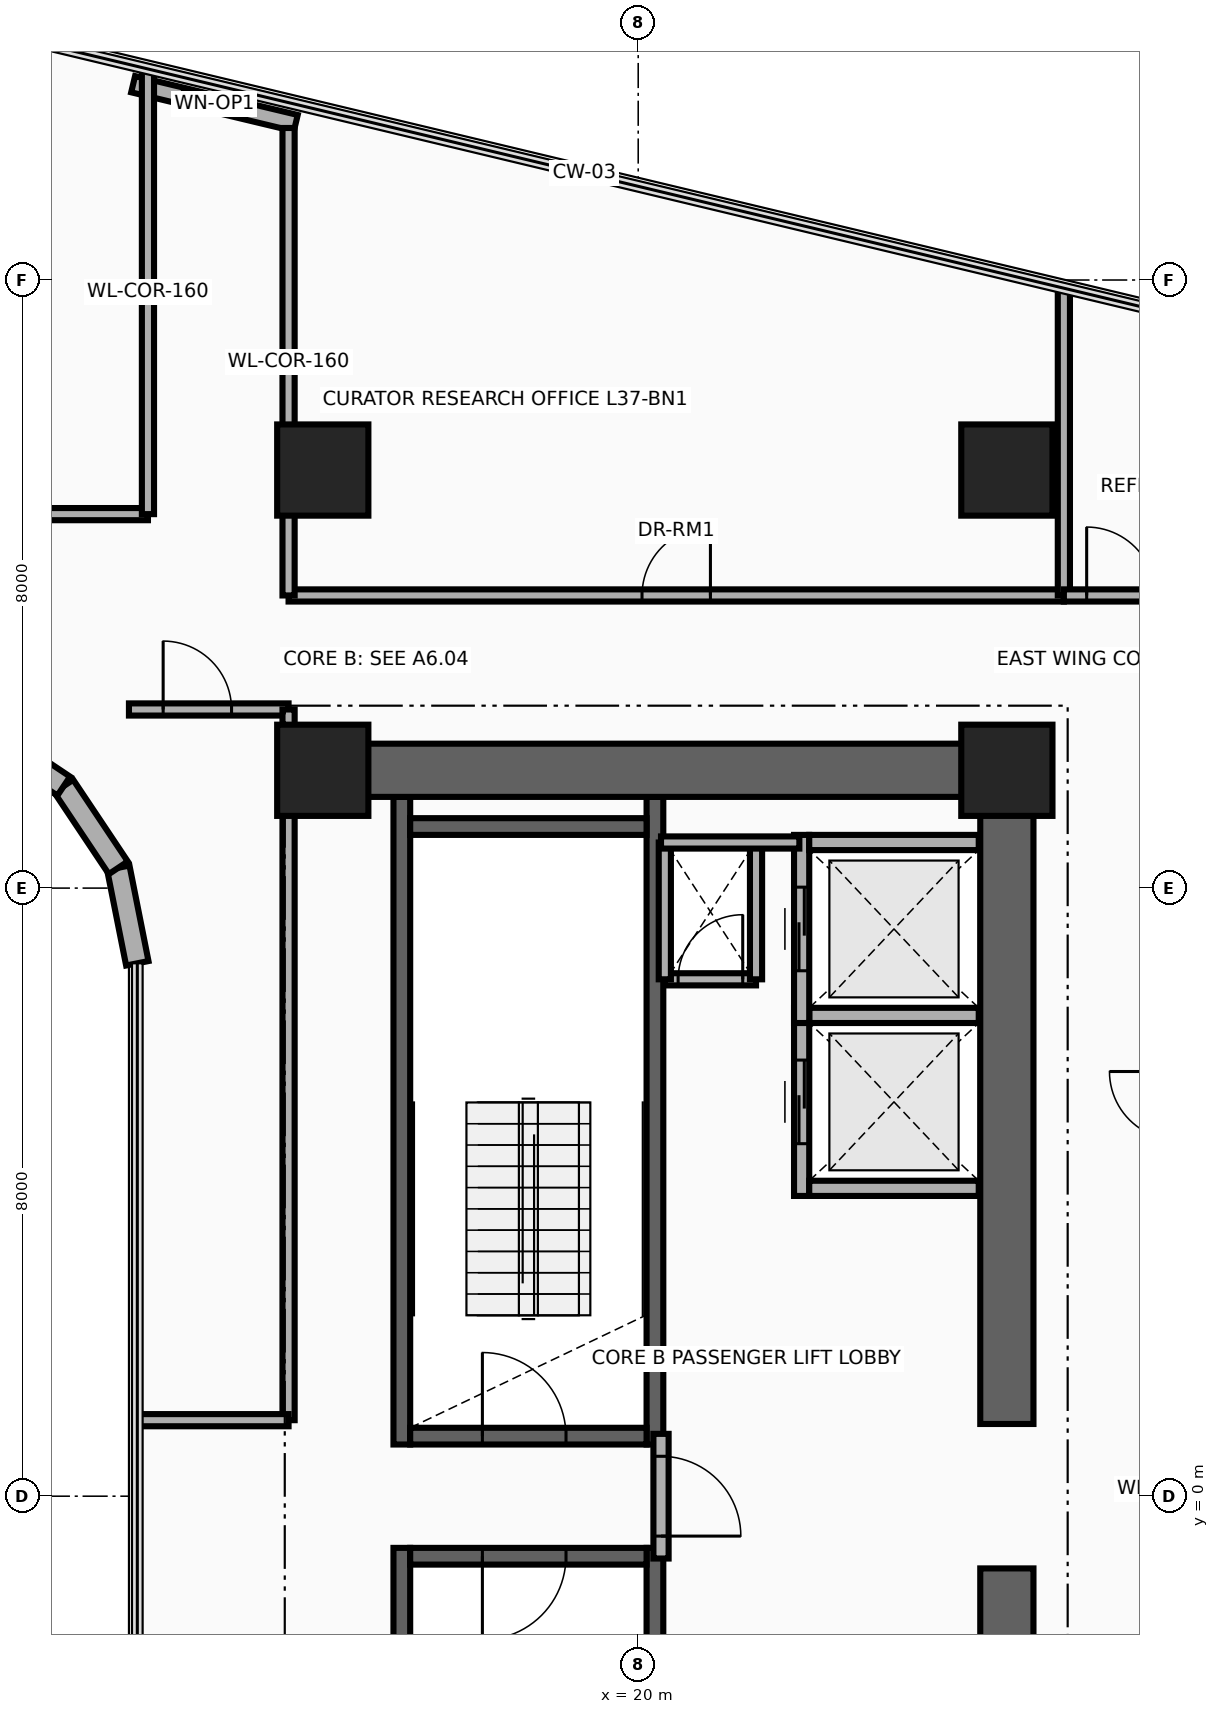
"""IFC4 building model, lengths in metres.
Left out: names, types, materials, properties, quantities, classifications, styles, units other than length and angle.
Written with IfcOpenShell. Run it as: python <this file> out.ifc"""

import sys

from ifc_helpers import new_model, si_unit, direction, frame, frame_2d, origin, origin_2d, place, context, subcontext, project, spatial, rectangle, extrude, source, transform, mapped, element, fill, save


model = new_model("IFC4")
c1 = context("Model", 3, precision=1e-05, world=origin(), true_north=direction((0.0, 1.0)))
c2 = subcontext(c1, "Body", "Model", "MODEL_VIEW")
j1 = project(units=[si_unit("LENGTHUNIT", "METRE"), si_unit("PLANEANGLEUNIT", "RADIAN")], contexts=[c1])
p1 = place(None, origin())
s1 = spatial("IfcSite", under=j1, at=p1, CompositionType="ELEMENT")
p2 = place(p1, origin())
s2 = spatial("IfcBuilding", under=s1, at=p2, CompositionType="ELEMENT")
p3 = place(p2, frame((0.0, 0.0, 146.4)))
s3 = spatial("IfcBuildingStorey", under=s2, at=p3, CompositionType="ELEMENT", Elevation=146.4)
for number, where, z_axis, x_axis in (
    (1, (16.89, 0.68, 0.0), (0.0, 0.0, 1.0), (0.0, 1.0, 0.0)),
    (2, (20.22, 0.68, 0.0), (0.0, 0.0, 1.0), (0.0, 1.0, 0.0)),
):
    element("IfcWall", number, at=place(p3, frame(where, z_axis=z_axis, x_axis=x_axis)), inside=s3, PredefinedType="SHEAR", context=c2, shape_type="SweptSolid", body=[
        extrude(rectangle(XDim=8.52, YDim=0.22, at=frame_2d((4.26, 0.0))), origin(), (0.0, 0.0, 1.0), 3.46),
    ])
p4 = place(p3, frame((17.0, 0.79, 0.0), z_axis=(0.0, 0.0, 1.0), x_axis=(1.0, 0.0, 0.0)))
e3 = element("IfcWall", 3, at=p4, inside=s3, PredefinedType="SHEAR", context=c2, shape_type="SweptSolid", body=[
    extrude(rectangle(XDim=3.11, YDim=0.22, at=frame_2d((1.555, 0.0))), origin(), (0.0, 0.0, 1.0), 3.46),
])
p5 = place(p4, frame((0.95, 0.0, 0.0)))
e4 = element("IfcOpeningElement", 4, at=p5, cuts=e3, PredefinedType="OPENING", context=c2, shape_type="SweptSolid", body=[
    extrude(rectangle(XDim=1.1, YDim=2.15, at=frame_2d((0.55, 1.075))), frame((0.0, 0.125, 0.0), z_axis=(0.0, -1.0, 0.0), x_axis=(1.0, 0.0, 0.0)), (0.0, 0.0, 1.0), 0.25),
])
p6 = place(p3, frame((17.0, 8.81, 0.0), z_axis=(0.0, 0.0, 1.0), x_axis=(1.0, 0.0, 0.0)))
e5 = element("IfcWall", 5, at=p6, inside=s3, PredefinedType="SHEAR", context=c2, shape_type="SweptSolid", body=[
    extrude(rectangle(XDim=3.11, YDim=0.22, at=frame_2d((1.555, 0.0))), origin(), (0.0, 0.0, 1.0), 3.46),
])
for number, where, z_axis, x_axis in (
    (6, (16.89, -9.2, 0.0), (0.0, 0.0, 1.0), (0.0, 1.0, 0.0)),
    (7, (20.22, -9.2, 0.0), (0.0, 0.0, 1.0), (0.0, 1.0, 0.0)),
):
    element("IfcWall", number, at=place(p3, frame(where, z_axis=z_axis, x_axis=x_axis)), inside=s3, PredefinedType="SHEAR", context=c2, shape_type="SweptSolid", body=[
        extrude(rectangle(XDim=8.52, YDim=0.22, at=frame_2d((4.26, 0.0))), origin(), (0.0, 0.0, 1.0), 3.46),
    ])
p7 = place(p3, frame((17.0, -0.79, 0.0), z_axis=(0.0, 0.0, 1.0), x_axis=(1.0, 0.0, 0.0)))
e8 = element("IfcWall", 8, at=p7, inside=s3, PredefinedType="SHEAR", context=c2, shape_type="SweptSolid", body=[
    extrude(rectangle(XDim=3.11, YDim=0.22, at=frame_2d((1.555, 0.0))), origin(), (0.0, 0.0, 1.0), 3.46),
])
p8 = place(p7, frame((0.95, 0.0, 0.0)))
e9 = element("IfcOpeningElement", 9, at=p8, cuts=e8, PredefinedType="OPENING", context=c2, shape_type="SweptSolid", body=[
    extrude(rectangle(XDim=1.1, YDim=2.15, at=frame_2d((0.55, 1.075))), frame((0.0, 0.125, 0.0), z_axis=(0.0, -1.0, 0.0), x_axis=(1.0, 0.0, 0.0)), (0.0, 0.0, 1.0), 0.25),
])
for number, where, z_axis, x_axis in (
    (10, (24.85, -9.9, 0.0), (0.0, 0.0, 1.0), (0.0, 1.0, 0.0)),
    (11, (24.85, 0.95, 0.0), (0.0, 0.0, 1.0), (0.0, 1.0, 0.0)),
):
    element("IfcWall", number, at=place(p3, frame(where, z_axis=z_axis, x_axis=x_axis)), inside=s3, PredefinedType="SHEAR", context=c2, shape_type="SweptSolid", body=[
        extrude(rectangle(XDim=8.95, YDim=0.7, at=frame_2d((4.475, 0.0))), origin(), (0.0, 0.0, 1.0), 3.46),
    ])
p9 = place(p3, frame((15.85, 9.55, 0.0), z_axis=(0.0, 0.0, 1.0), x_axis=(1.0, 0.0, 0.0)))
e12 = element("IfcWall", 12, at=p9, inside=s3, PredefinedType="SHEAR", context=c2, shape_type="SweptSolid", body=[
    extrude(rectangle(XDim=9.0, YDim=0.7, at=frame_2d((4.5, 0.0))), origin(), (0.0, 0.0, 1.0), 3.46),
])
m1 = source(origin(), c2, "Body", "SweptSolid", [
    extrude(rectangle(XDim=1.2, YDim=1.2, at=origin_2d()), origin(), (0.0, 0.0, 1.0), 3.7),
])
for number, where, z_axis, x_axis in (
    (13, (15.85, 9.55, 0.0), (0.0, 0.0, 1.0), (1.0, 0.0, 0.0)),
    (14, (24.85, 9.55, 0.0), (0.0, 0.0, 1.0), (1.0, 0.0, 0.0)),
    (15, (15.85, 13.5, 0.0), (0.0, 0.0, 1.0), (1.0, 0.0, 0.0)),
    (16, (24.85, 13.5, 0.0), (0.0, 0.0, 1.0), (1.0, 0.0, 0.0)),
):
    element("IfcColumn", number, at=place(p3, frame(where, z_axis=z_axis, x_axis=x_axis)), inside=s3, PredefinedType="COLUMN", context=c2, shape_type="MappedRepresentation", body=[
        mapped(m1, transform((0.0, 0.0, 0.0), x_axis=(1.0, 0.0, 0.0), y_axis=(0.0, 1.0, 0.0), z_axis=(0.0, 0.0, 1.0), scale=1.0)),
    ])
p10 = place(p3, frame((13.355, 18.576, 0.0), z_axis=(0.0, 0.0, 1.0), x_axis=(0.97252211384, -0.232810519721, 0.0)))
e17 = element("IfcWall", 17, at=p10, inside=s3, PredefinedType="SOLIDWALL", context=c2, shape_type="SweptSolid", body=[
    extrude(rectangle(XDim=2.2, YDim=0.22, at=frame_2d((1.1, 0.0))), origin(), (0.0, 0.0, 1.0), 3.46),
])
p11 = place(p10, frame((0.65, 0.0, 0.95)))
e18 = element("IfcOpeningElement", 18, at=p11, cuts=e17, PredefinedType="OPENING", context=c2, shape_type="SweptSolid", body=[
    extrude(rectangle(XDim=0.9, YDim=1.3, at=frame_2d((0.45, 0.65))), frame((0.0, 0.125, 0.0), z_axis=(0.0, -1.0, 0.0), x_axis=(1.0, 0.0, 0.0)), (0.0, 0.0, 1.0), 0.25),
])
p12 = place(p3, frame((13.41, 7.011, 0.0), z_axis=(0.0, 0.0, 1.0), x_axis=(-0.195090163074, 0.980785312019, 0.0)))
e19 = element("IfcWall", 19, at=p12, inside=s3, PredefinedType="SOLIDWALL", context=c2, shape_type="SweptSolid", body=[
    extrude(rectangle(XDim=1.281, YDim=0.3, at=frame_2d((0.641, 0.0))), origin(), (0.0, 0.0, 1.0), 3.46),
])
for number, where, z_axis, x_axis in (
    (20, (13.16, 8.268, 0.0), (0.0, 0.0, 1.0), (-0.556, 0.831, 0.0)),
    (21, (12.442, 9.342, 0.0), (0.0, 0.0, 1.0), (-0.831, 0.556, 0.0)),
):
    element("IfcWall", number, at=place(p3, frame(where, z_axis=z_axis, x_axis=x_axis)), inside=s3, PredefinedType="SOLIDWALL", context=c2, shape_type="SweptSolid", body=[
        extrude(rectangle(XDim=1.292, YDim=0.3, at=frame_2d((0.646, 0.0))), origin(), (0.0, 0.0, 1.0), 3.46),
    ])
p13 = place(p3, frame((22.15, 3.95, 0.0), z_axis=(0.0, 0.0, 1.0), x_axis=(0.0, 1.0, 0.0)))
e22 = element("IfcWall", 22, at=p13, inside=s3, PredefinedType="MOVABLE", context=c2, shape_type="SweptSolid", body=[
    extrude(rectangle(XDim=2.475, YDim=0.2, at=frame_2d((1.238, 0.0))), origin(), (0.0, 0.0, 1.0), 3.46),
])
p14 = place(p13, frame((0.688, 0.0, 0.0)))
e23 = element("IfcOpeningElement", 23, at=p14, cuts=e22, PredefinedType="OPENING", context=c2, shape_type="SweptSolid", body=[
    extrude(rectangle(XDim=1.1, YDim=2.1, at=frame_2d((0.55, 1.05))), frame((0.0, 0.115, 0.0), z_axis=(0.0, -1.0, 0.0), x_axis=(1.0, 0.0, 0.0)), (0.0, 0.0, 1.0), 0.23),
])
for number, where, z_axis, x_axis in (
    (24, (22.25, 4.05, 0.0), (0.0, 0.0, 1.0), (1.0, 0.0, 0.0)),
    (25, (22.25, 6.325, 0.0), (0.0, 0.0, 1.0), (1.0, 0.0, 0.0)),
):
    element("IfcWall", number, at=place(p3, frame(where, z_axis=z_axis, x_axis=x_axis)), inside=s3, PredefinedType="MOVABLE", context=c2, shape_type="SweptSolid", body=[
        extrude(rectangle(XDim=2.23, YDim=0.2, at=frame_2d((1.115, 0.0))), origin(), (0.0, 0.0, 1.0), 2.245),
    ])
p15 = place(p3, frame((22.15, 6.225, 0.0), z_axis=(0.0, 0.0, 1.0), x_axis=(0.0, 1.0, 0.0)))
e26 = element("IfcWall", 26, at=p15, inside=s3, PredefinedType="MOVABLE", context=c2, shape_type="SweptSolid", body=[
    extrude(rectangle(XDim=2.475, YDim=0.2, at=frame_2d((1.237, 0.0))), origin(), (0.0, 0.0, 1.0), 3.46),
])
p16 = place(p15, frame((0.688, 0.0, 0.0)))
e27 = element("IfcOpeningElement", 27, at=p16, cuts=e26, PredefinedType="OPENING", context=c2, shape_type="SweptSolid", body=[
    extrude(rectangle(XDim=1.1, YDim=2.1, at=frame_2d((0.55, 1.05))), frame((0.0, 0.115, 0.0), z_axis=(0.0, -1.0, 0.0), x_axis=(1.0, 0.0, 0.0)), (0.0, 0.0, 1.0), 0.23),
])
p17 = place(p3, frame((22.25, 8.6, 0.0), z_axis=(0.0, 0.0, 1.0), x_axis=(1.0, 0.0, 0.0)))
e28 = element("IfcWall", 28, at=p17, inside=s3, PredefinedType="MOVABLE", context=c2, shape_type="SweptSolid", body=[
    extrude(rectangle(XDim=2.23, YDim=0.2, at=frame_2d((1.115, 0.0))), origin(), (0.0, 0.0, 1.0), 2.245),
])
p18 = place(p3, frame((20.3, -0.82, 0.0), z_axis=(0.0, 0.0, 1.0), x_axis=(0.0, 1.0, 0.0)))
e29 = element("IfcWall", 29, at=p18, inside=s3, PredefinedType="PARTITIONING", context=c2, shape_type="SweptSolid", body=[
    extrude(rectangle(XDim=1.64, YDim=0.2, at=frame_2d((0.82, 0.0))), origin(), (0.0, 0.0, 1.0), 3.46),
])
p19 = place(p18, frame((0.295, 0.0, 0.0)))
e30 = element("IfcOpeningElement", 30, at=p19, cuts=e29, PredefinedType="OPENING", context=c2, shape_type="SweptSolid", body=[
    extrude(rectangle(XDim=1.05, YDim=2.15, at=frame_2d((0.525, 1.075))), frame((0.0, 0.115, 0.0), z_axis=(0.0, -1.0, 0.0), x_axis=(1.0, 0.0, 0.0)), (0.0, 0.0, 1.0), 0.23),
])
p20 = place(p3, frame((20.35, 6.8, 0.0), z_axis=(0.0, 0.0, 1.0), x_axis=(1.0, 0.0, 0.0)))
e31 = element("IfcWall", 31, at=p20, inside=s3, PredefinedType="PARTITIONING", context=c2, shape_type="SweptSolid", body=[
    extrude(rectangle(XDim=1.2, YDim=0.16, at=frame_2d((0.6, 0.0))), origin(), (0.0, 0.0, 1.0), 3.46),
])
p21 = place(p20, frame((0.175, 0.0, 0.0)))
e32 = element("IfcOpeningElement", 32, at=p21, cuts=e31, PredefinedType="OPENING", context=c2, shape_type="SweptSolid", body=[
    extrude(rectangle(XDim=0.85, YDim=2.05, at=frame_2d((0.425, 1.025))), frame((0.0, 0.095, 0.0), z_axis=(0.0, -1.0, 0.0), x_axis=(1.0, 0.0, 0.0)), (0.0, 0.0, 1.0), 0.19),
])
for number, where, z_axis, x_axis in (
    (33, (21.55, 6.8, 0.0), (0.0, 0.0, 1.0), (0.0, 1.0, 0.0)),
    (34, (20.35, 6.8, 0.0), (0.0, 0.0, 1.0), (0.0, 1.0, 0.0)),
):
    element("IfcWall", number, at=place(p3, frame(where, z_axis=z_axis, x_axis=x_axis)), inside=s3, PredefinedType="PARTITIONING", context=c2, shape_type="SweptSolid", body=[
        extrude(rectangle(XDim=1.8, YDim=0.16, at=frame_2d((0.9, 0.0))), origin(), (0.0, 0.0, 1.0), 3.46),
    ])
p22 = place(p3, frame((20.3, 8.6, 0.0), z_axis=(0.0, 0.0, 1.0), x_axis=(1.0, 0.0, 0.0)))
e35 = element("IfcWall", 35, at=p22, inside=s3, PredefinedType="PARTITIONING", context=c2, shape_type="SweptSolid", body=[
    extrude(rectangle(XDim=1.82, YDim=0.16, at=frame_2d((0.91, 0.0))), origin(), (0.0, 0.0, 1.0), 3.46),
])
p23 = place(p3, frame((-28.25, 12.92, 0.0), z_axis=(0.0, 0.0, 1.0), x_axis=(1.0, 0.0, 0.0)))
e36 = element("IfcWall", 36, at=p23, inside=s3, PredefinedType="PARTITIONING", context=c2, shape_type="SweptSolid", body=[
    extrude(rectangle(XDim=41.8, YDim=0.16, at=frame_2d((20.9, 0.0))), origin(), (0.0, 0.0, 1.0), 2.666),
])
p24 = place(p23, frame((4.0, 0.0, 0.0)))
e37 = element("IfcOpeningElement", 37, at=p24, cuts=e36, PredefinedType="OPENING", context=c2, shape_type="SweptSolid", body=[
    extrude(rectangle(XDim=0.9, YDim=2.1, at=frame_2d((0.45, 1.05))), frame((0.0, 0.095, 0.0), z_axis=(0.0, -1.0, 0.0), x_axis=(1.0, 0.0, 0.0)), (0.0, 0.0, 1.0), 0.19),
])
p25 = place(p23, frame((18.205, 0.0, 0.0)))
e38 = element("IfcOpeningElement", 38, at=p25, cuts=e36, PredefinedType="OPENING", context=c2, shape_type="SweptSolid", body=[
    extrude(rectangle(XDim=0.9, YDim=2.1, at=frame_2d((0.45, 1.05))), frame((0.0, 0.095, 0.0), z_axis=(0.0, -1.0, 0.0), x_axis=(1.0, 0.0, 0.0)), (0.0, 0.0, 1.0), 0.19),
])
p26 = place(p23, frame((33.635, 0.0, 0.0)))
e39 = element("IfcOpeningElement", 39, at=p26, cuts=e36, PredefinedType="OPENING", context=c2, shape_type="SweptSolid", body=[
    extrude(rectangle(XDim=0.9, YDim=2.1, at=frame_2d((0.45, 1.05))), frame((0.0, 0.095, 0.0), z_axis=(0.0, -1.0, 0.0), x_axis=(1.0, 0.0, 0.0)), (0.0, 0.0, 1.0), 0.19),
])
p27 = place(p3, frame((13.55, 12.92, 0.0), z_axis=(0.0, 0.0, 1.0), x_axis=(0.0, 1.0, 0.0)))
e40 = element("IfcWall", 40, at=p27, inside=s3, PredefinedType="PARTITIONING", context=c2, shape_type="SweptSolid", body=[
    extrude(rectangle(XDim=5.857, YDim=0.16, at=frame_2d((2.928, 0.0))), origin(), (0.0, 0.0, 1.0), 2.666),
])
p28 = place(p3, frame((15.4, 11.85, 0.0), z_axis=(0.0, 0.0, 1.0), x_axis=(1.0, 0.0, 0.0)))
e41 = element("IfcWall", 41, at=p28, inside=s3, PredefinedType="PARTITIONING", context=c2, shape_type="SweptSolid", body=[
    extrude(rectangle(XDim=10.2, YDim=0.16, at=frame_2d((5.1, 0.0))), origin(), (0.0, 0.0, 1.0), 2.834),
])
p29 = place(p28, frame((4.65, 0.0, 0.0)))
e42 = element("IfcOpeningElement", 42, at=p29, cuts=e41, PredefinedType="OPENING", context=c2, shape_type="SweptSolid", body=[
    extrude(rectangle(XDim=0.9, YDim=2.1, at=frame_2d((0.45, 1.05))), frame((0.0, 0.095, 0.0), z_axis=(0.0, -1.0, 0.0), x_axis=(1.0, 0.0, 0.0)), (0.0, 0.0, 1.0), 0.19),
])
p30 = place(p3, frame((15.4, 11.85, 0.0), z_axis=(0.0, 0.0, 1.0), x_axis=(0.0, 1.0, 0.0)))
e43 = element("IfcWall", 43, at=p30, inside=s3, PredefinedType="PARTITIONING", context=c2, shape_type="SweptSolid", body=[
    extrude(rectangle(XDim=6.15, YDim=0.16, at=frame_2d((3.075, 0.0))), origin(), (0.0, 0.0, 1.0), 2.666),
])
p31 = place(p3, frame((25.6, 11.85, 0.0), z_axis=(0.0, 0.0, 1.0), x_axis=(0.0, 1.0, 0.0)))
e44 = element("IfcWall", 44, at=p31, inside=s3, PredefinedType="PARTITIONING", context=c2, shape_type="SweptSolid", body=[
    extrude(rectangle(XDim=4.042, YDim=0.16, at=frame_2d((2.021, 0.0))), origin(), (0.0, 0.0, 1.0), 2.666),
])
p32 = place(p3, frame((25.6, 11.85, 0.0), z_axis=(0.0, 0.0, 1.0), x_axis=(1.0, 0.0, 0.0)))
e45 = element("IfcWall", 45, at=p32, inside=s3, PredefinedType="PARTITIONING", context=c2, shape_type="SweptSolid", body=[
    extrude(rectangle(XDim=4.09, YDim=0.16, at=frame_2d((2.045, 0.0))), origin(), (0.0, 0.0, 1.0), 2.896),
])
p33 = place(p32, frame((0.3, 0.0, 0.0)))
e46 = element("IfcOpeningElement", 46, at=p33, cuts=e45, PredefinedType="OPENING", context=c2, shape_type="SweptSolid", body=[
    extrude(rectangle(XDim=0.9, YDim=2.1, at=frame_2d((0.45, 1.05))), frame((0.0, 0.095, 0.0), z_axis=(0.0, -1.0, 0.0), x_axis=(1.0, 0.0, 0.0)), (0.0, 0.0, 1.0), 0.19),
])
p34 = place(p3, frame((13.3, 10.35, 0.0), z_axis=(0.0, 0.0, 1.0), x_axis=(1.0, 0.0, 0.0)))
e47 = element("IfcWall", 47, at=p34, inside=s3, PredefinedType="PARTITIONING", context=c2, shape_type="SweptSolid", body=[
    extrude(rectangle(XDim=2.1, YDim=0.16, at=frame_2d((1.05, 0.0))), origin(), (0.0, 0.0, 1.0), 2.666),
])
p35 = place(p34, frame((0.45, 0.0, 0.0)))
e48 = element("IfcOpeningElement", 48, at=p35, cuts=e47, PredefinedType="OPENING", context=c2, shape_type="SweptSolid", body=[
    extrude(rectangle(XDim=0.9, YDim=2.1, at=frame_2d((0.45, 1.05))), frame((0.0, 0.095, 0.0), z_axis=(0.0, -1.0, 0.0), x_axis=(1.0, 0.0, 0.0)), (0.0, 0.0, 1.0), 0.19),
])
p36 = place(p3, frame((15.4, 1.0, 0.0), z_axis=(0.0, 0.0, 1.0), x_axis=(0.0, 1.0, 0.0)))
e49 = element("IfcWall", 49, at=p36, inside=s3, PredefinedType="PARTITIONING", context=c2, shape_type="SweptSolid", body=[
    extrude(rectangle(XDim=9.35, YDim=0.16, at=frame_2d((4.675, 0.0))), origin(), (0.0, 0.0, 1.0), 2.245),
])
p37 = place(p3, frame((13.41, 1.0, 0.0), z_axis=(0.0, 0.0, 1.0), x_axis=(1.0, 0.0, 0.0)))
e50 = element("IfcWall", 50, at=p37, inside=s3, PredefinedType="PARTITIONING", context=c2, shape_type="SweptSolid", body=[
    extrude(rectangle(XDim=1.99, YDim=0.16, at=frame_2d((0.995, 0.0))), origin(), (0.0, 0.0, 1.0), 2.245),
])
p38 = place(p11, origin())
e51 = element("IfcWindow", 51, at=p38, inside=s3, PartitioningType="SINGLE_PANEL", PredefinedType="WINDOW", context=c2, shape_type="SweptSolid", body=[
    extrude(rectangle(XDim=0.9, YDim=1.3, at=frame_2d((0.45, 0.65))), frame((0.0, 0.03, 0.0), z_axis=(0.0, -1.0, 0.0), x_axis=(1.0, 0.0, 0.0)), (0.0, 0.0, 1.0), 0.06),
])
fill(e18, e51)
p39 = place(p14, origin())
e52 = element("IfcDoor", 52, at=p39, inside=s3, OperationType="DOUBLE_DOOR_SLIDING", PredefinedType="DOOR", context=c2, shape_type="SweptSolid", body=[
    extrude(rectangle(XDim=1.1, YDim=2.1, at=frame_2d((0.55, 1.05))), frame((0.0, 0.025, 0.0), z_axis=(0.0, -1.0, 0.0), x_axis=(1.0, 0.0, 0.0)), (0.0, 0.0, 1.0), 0.05),
])
fill(e23, e52)
p40 = place(p16, origin())
e53 = element("IfcDoor", 53, at=p40, inside=s3, OperationType="DOUBLE_DOOR_SLIDING", PredefinedType="DOOR", context=c2, shape_type="SweptSolid", body=[
    extrude(rectangle(XDim=1.1, YDim=2.1, at=frame_2d((0.55, 1.05))), frame((0.0, 0.025, 0.0), z_axis=(0.0, -1.0, 0.0), x_axis=(1.0, 0.0, 0.0)), (0.0, 0.0, 1.0), 0.05),
])
fill(e27, e53)
p41 = place(p19, frame((1.05, 0.0, 0.0), z_axis=(0.0, 0.0, 1.0), x_axis=(-1.0, 0.0, 0.0)))
e54 = element("IfcDoor", 54, at=p41, inside=s3, OperationType="SINGLE_SWING_LEFT", PredefinedType="DOOR", context=c2, shape_type="SweptSolid", body=[
    extrude(rectangle(XDim=1.05, YDim=2.15, at=frame_2d((0.525, 1.075))), frame((0.0, 0.025, 0.0), z_axis=(0.0, -1.0, 0.0), x_axis=(1.0, 0.0, 0.0)), (0.0, 0.0, 1.0), 0.05),
])
fill(e30, e54)
p42 = place(p5, origin())
e55 = element("IfcDoor", 55, at=p42, inside=s3, OperationType="SINGLE_SWING_RIGHT", PredefinedType="DOOR", context=c2, shape_type="SweptSolid", body=[
    extrude(rectangle(XDim=1.1, YDim=2.15, at=frame_2d((0.55, 1.075))), frame((0.0, 0.025, 0.0), z_axis=(0.0, -1.0, 0.0), x_axis=(1.0, 0.0, 0.0)), (0.0, 0.0, 1.0), 0.05),
])
fill(e4, e55)
p43 = place(p8, frame((1.1, 0.0, 0.0), z_axis=(0.0, 0.0, 1.0), x_axis=(-1.0, 0.0, 0.0)))
e56 = element("IfcDoor", 56, at=p43, inside=s3, OperationType="SINGLE_SWING_LEFT", PredefinedType="DOOR", context=c2, shape_type="SweptSolid", body=[
    extrude(rectangle(XDim=1.1, YDim=2.15, at=frame_2d((0.55, 1.075))), frame((0.0, 0.025, 0.0), z_axis=(0.0, -1.0, 0.0), x_axis=(1.0, 0.0, 0.0)), (0.0, 0.0, 1.0), 0.05),
])
fill(e9, e56)
p44 = place(p21, origin())
e57 = element("IfcDoor", 57, at=p44, inside=s3, OperationType="SINGLE_SWING_RIGHT", PredefinedType="DOOR", context=c2, shape_type="SweptSolid", body=[
    extrude(rectangle(XDim=0.85, YDim=2.05, at=frame_2d((0.425, 1.025))), frame((0.0, 0.025, 0.0), z_axis=(0.0, -1.0, 0.0), x_axis=(1.0, 0.0, 0.0)), (0.0, 0.0, 1.0), 0.05),
])
fill(e32, e57)
p45 = place(p29, origin())
e58 = element("IfcDoor", 58, at=p45, inside=s3, OperationType="SINGLE_SWING_RIGHT", PredefinedType="DOOR", context=c2, shape_type="SweptSolid", body=[
    extrude(rectangle(XDim=0.9, YDim=2.1, at=frame_2d((0.45, 1.05))), frame((0.0, 0.025, 0.0), z_axis=(0.0, -1.0, 0.0), x_axis=(1.0, 0.0, 0.0)), (0.0, 0.0, 1.0), 0.05),
])
fill(e42, e58)
p46 = place(p33, origin())
e59 = element("IfcDoor", 59, at=p46, inside=s3, OperationType="SINGLE_SWING_RIGHT", PredefinedType="DOOR", context=c2, shape_type="SweptSolid", body=[
    extrude(rectangle(XDim=0.9, YDim=2.1, at=frame_2d((0.45, 1.05))), frame((0.0, 0.025, 0.0), z_axis=(0.0, -1.0, 0.0), x_axis=(1.0, 0.0, 0.0)), (0.0, 0.0, 1.0), 0.05),
])
fill(e46, e59)
p47 = place(p35, origin())
e60 = element("IfcDoor", 60, at=p47, inside=s3, OperationType="SINGLE_SWING_LEFT", PredefinedType="DOOR", context=c2, shape_type="SweptSolid", body=[
    extrude(rectangle(XDim=0.9, YDim=2.1, at=frame_2d((0.45, 1.05))), frame((0.0, 0.025, 0.0), z_axis=(0.0, -1.0, 0.0), x_axis=(1.0, 0.0, 0.0)), (0.0, 0.0, 1.0), 0.05),
])
fill(e48, e60)
save(model, sys.argv[1])
